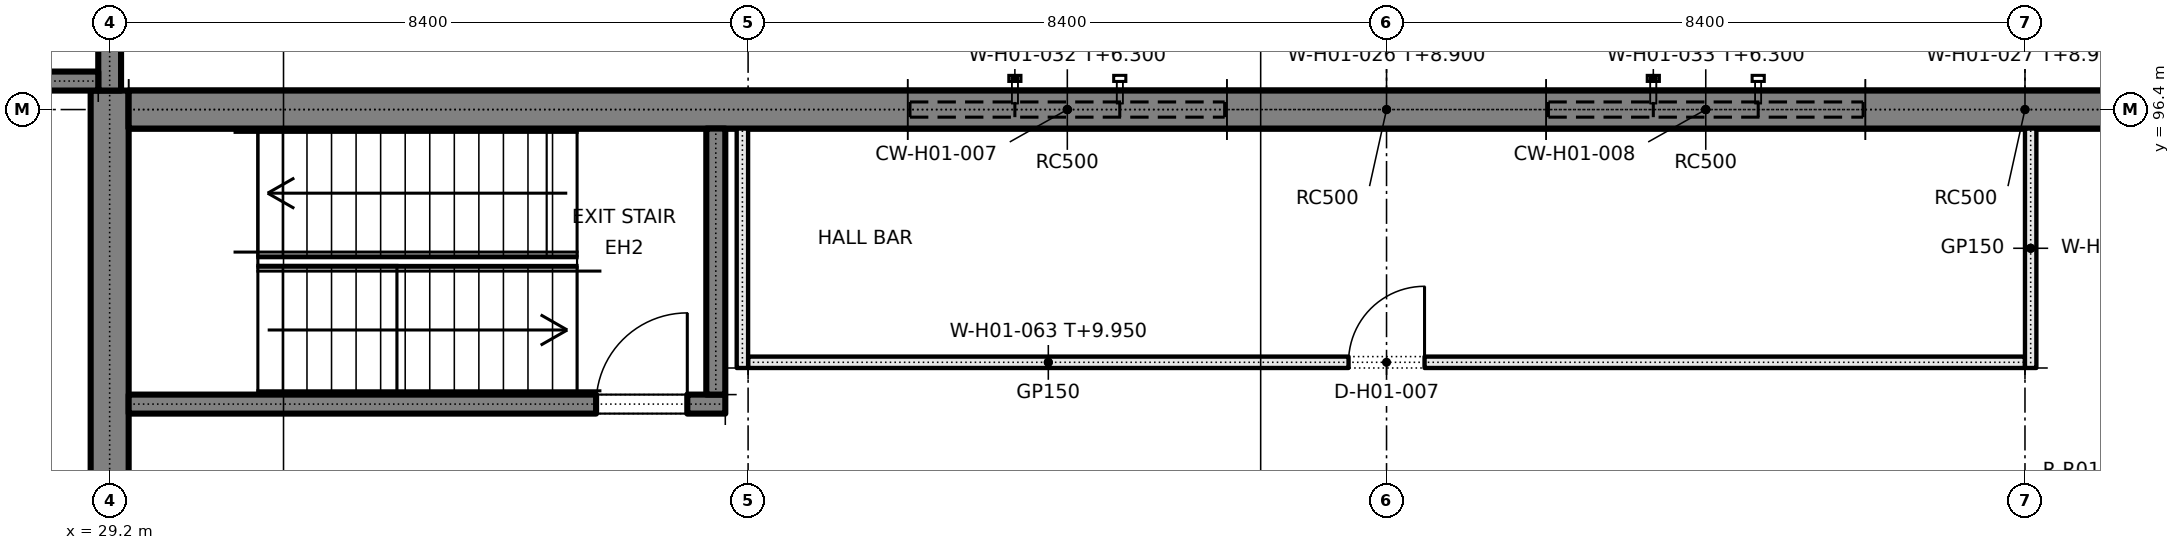
"""IFC4 building model, lengths in metres.
Left out: names, types, materials, properties, quantities, classifications, styles, units other than length and angle.
Written with IfcOpenShell. Run it as: python <this file> out.ifc"""

import sys

from ifc_helpers import new_model, si_unit, direction, frame, frame_2d, origin, place, context, subcontext, project, spatial, rectangle, extrude, element, fill, save


model = new_model("IFC4")
c1 = context("Model", 3, precision=1e-05, world=origin(), true_north=direction((0.0, 1.0)))
c2 = subcontext(c1, "Body", "Model", "MODEL_VIEW")
j1 = project(units=[si_unit("LENGTHUNIT", "METRE"), si_unit("PLANEANGLEUNIT", "RADIAN")], contexts=[c1])
p1 = place(None, origin())
s1 = spatial("IfcSite", under=j1, at=p1, CompositionType="ELEMENT")
p2 = place(p1, origin())
s2 = spatial("IfcBuilding", under=s1, at=p2, CompositionType="ELEMENT")
p3 = place(p2, frame((0.0, 0.0, 5.4)))
s3 = spatial("IfcBuildingStorey", under=s2, at=p3, CompositionType="ELEMENT", Elevation=5.4)
p4 = place(p3, frame((29.2, 54.15, 0.0), z_axis=(0.0, 0.0, 1.0), x_axis=(0.0, 1.0, 0.0)))
e1 = element("IfcWall", 1, at=p4, inside=s3, PredefinedType="SOLIDWALL", context=c2, shape_type="SweptSolid", body=[
    extrude(rectangle(XDim=42.5, YDim=0.5, at=frame_2d((21.25, 0.0))), origin(), (0.0, 0.0, 1.0), 4.8),
])
p5 = place(p4, frame((7.75, 0.0, 0.0)))
e2 = element("IfcOpeningElement", 2, at=p5, cuts=e1, PredefinedType="OPENING", context=c2, shape_type="SweptSolid", body=[
    extrude(rectangle(XDim=1.8, YDim=2.1, at=frame_2d((0.9, 1.05))), frame((0.0, 0.26, 0.0), z_axis=(0.0, -1.0, 0.0), x_axis=(1.0, 0.0, 0.0)), (0.0, 0.0, 1.0), 0.52),
])
p6 = place(p4, frame((20.35, 0.0, 0.0)))
e3 = element("IfcOpeningElement", 3, at=p6, cuts=e1, PredefinedType="OPENING", context=c2, shape_type="SweptSolid", body=[
    extrude(rectangle(XDim=1.8, YDim=2.1, at=frame_2d((0.9, 1.05))), frame((0.0, 0.26, 0.0), z_axis=(0.0, -1.0, 0.0), x_axis=(1.0, 0.0, 0.0)), (0.0, 0.0, 1.0), 0.52),
])
p7 = place(p4, frame((32.95, 0.0, 0.0)))
e4 = element("IfcOpeningElement", 4, at=p7, cuts=e1, PredefinedType="OPENING", context=c2, shape_type="SweptSolid", body=[
    extrude(rectangle(XDim=1.8, YDim=2.1, at=frame_2d((0.9, 1.05))), frame((0.0, 0.26, 0.0), z_axis=(0.0, -1.0, 0.0), x_axis=(1.0, 0.0, 0.0)), (0.0, 0.0, 1.0), 0.52),
])
p8 = place(p3, frame((29.45, 96.4, 0.0), z_axis=(0.0, 0.0, 1.0), x_axis=(1.0, 0.0, 0.0)))
e5 = element("IfcWall", 5, at=p8, inside=s3, PredefinedType="SOLIDWALL", context=c2, shape_type="SweptSolid", body=[
    extrude(rectangle(XDim=10.25, YDim=0.5, at=frame_2d((5.125, 0.0))), origin(), (0.0, 0.0, 1.0), 3.5),
])
p9 = place(p3, frame((43.9, 96.4, 0.0), z_axis=(0.0, 0.0, 1.0), x_axis=(1.0, 0.0, 0.0)))
e6 = element("IfcWall", 6, at=p9, inside=s3, PredefinedType="SOLIDWALL", context=c2, shape_type="SweptSolid", body=[
    extrude(rectangle(XDim=4.2, YDim=0.5, at=frame_2d((2.1, 0.0))), origin(), (0.0, 0.0, 1.0), 3.5),
])
p10 = place(p3, frame((52.3, 96.4, 0.0), z_axis=(0.0, 0.0, 1.0), x_axis=(1.0, 0.0, 0.0)))
e7 = element("IfcWall", 7, at=p10, inside=s3, PredefinedType="SOLIDWALL", context=c2, shape_type="SweptSolid", body=[
    extrude(rectangle(XDim=4.2, YDim=0.5, at=frame_2d((2.1, 0.0))), origin(), (0.0, 0.0, 1.0), 3.5),
])
for number, where, z_axis, x_axis in (
    (8, (39.7, 96.4, 0.0), (0.0, 0.0, 1.0), (1.0, 0.0, 0.0)),
    (9, (48.1, 96.4, 0.0), (0.0, 0.0, 1.0), (1.0, 0.0, 0.0)),
):
    element("IfcWall", number, at=place(p3, frame(where, z_axis=z_axis, x_axis=x_axis)), inside=s3, PredefinedType="SOLIDWALL", context=c2, shape_type="SweptSolid", body=[
        extrude(rectangle(XDim=4.2, YDim=0.5, at=frame_2d((2.1, 0.0))), origin(), (0.0, 0.0, 1.0), 0.9),
    ])
p11 = place(p3, frame((29.45, 96.4, 3.5), z_axis=(0.0, 0.0, 1.0), x_axis=(1.0, 0.0, 0.0)))
e10 = element("IfcWall", 10, at=p11, inside=s3, PredefinedType="SOLIDWALL", context=c2, shape_type="SweptSolid", body=[
    extrude(rectangle(XDim=66.7, YDim=0.5, at=frame_2d((33.35, 0.0))), origin(), (0.0, 0.0, 1.0), 1.3),
])
p12 = place(p3, frame((29.45, 92.525, 0.0), z_axis=(0.0, 0.0, 1.0), x_axis=(1.0, 0.0, 0.0)))
e11 = element("IfcWall", 11, at=p12, inside=s3, PredefinedType="SOLIDWALL", context=c2, shape_type="SweptSolid", body=[
    extrude(rectangle(XDim=7.85, YDim=0.25, at=frame_2d((3.925, 0.0))), origin(), (0.0, 0.0, 1.0), 4.8),
])
p13 = place(p12, frame((6.15, 0.0, 0.0)))
e12 = element("IfcOpeningElement", 12, at=p13, cuts=e11, PredefinedType="OPENING", context=c2, shape_type="SweptSolid", body=[
    extrude(rectangle(XDim=1.2, YDim=2.1, at=frame_2d((0.6, 1.05))), frame((0.0, 0.135, 0.0), z_axis=(0.0, -1.0, 0.0), x_axis=(1.0, 0.0, 0.0)), (0.0, 0.0, 1.0), 0.27),
])
p14 = place(p3, frame((37.175, 92.65, 0.0), z_axis=(0.0, 0.0, 1.0), x_axis=(0.0, 1.0, 0.0)))
e13 = element("IfcWall", 13, at=p14, inside=s3, PredefinedType="SOLIDWALL", context=c2, shape_type="SweptSolid", body=[
    extrude(rectangle(XDim=3.5, YDim=0.25, at=frame_2d((1.75, 0.0))), origin(), (0.0, 0.0, 1.0), 4.8),
])
p15 = place(p3, frame((29.2, 96.65, 0.0), z_axis=(0.0, 0.0, 1.0), x_axis=(0.0, 1.0, 0.0)))
e14 = element("IfcWall", 14, at=p15, inside=s3, PredefinedType="SOLIDWALL", context=c2, shape_type="SweptSolid", body=[
    extrude(rectangle(XDim=7.963, YDim=0.3, at=frame_2d((3.982, 0.0))), origin(), (0.0, 0.0, 1.0), 4.8),
])
p16 = place(p3, frame((37.6, 93.075, 0.0), z_axis=(0.0, 0.0, 1.0), x_axis=(1.0, 0.0, 0.0)))
e15 = element("IfcWall", 15, at=p16, inside=s3, PredefinedType="PARTITIONING", context=c2, shape_type="SweptSolid", body=[
    extrude(rectangle(XDim=16.8, YDim=0.15, at=frame_2d((8.4, 0.0))), origin(), (0.0, 0.0, 1.0), 4.55),
])
p17 = place(p16, frame((7.9, 0.0, 0.0)))
e16 = element("IfcOpeningElement", 16, at=p17, cuts=e15, PredefinedType="OPENING", context=c2, shape_type="SweptSolid", body=[
    extrude(rectangle(XDim=1.0, YDim=2.1, at=frame_2d((0.5, 1.05))), frame((0.0, 0.085, 0.0), z_axis=(0.0, -1.0, 0.0), x_axis=(1.0, 0.0, 0.0)), (0.0, 0.0, 1.0), 0.17),
])
p18 = place(p3, frame((37.525, 93.0, 0.0), z_axis=(0.0, 0.0, 1.0), x_axis=(0.0, 1.0, 0.0)))
e17 = element("IfcWall", 17, at=p18, inside=s3, PredefinedType="PARTITIONING", context=c2, shape_type="SweptSolid", body=[
    extrude(rectangle(XDim=3.15, YDim=0.15, at=frame_2d((1.575, 0.0))), origin(), (0.0, 0.0, 1.0), 3.95),
])
p19 = place(p3, frame((54.475, 93.0, 0.0), z_axis=(0.0, 0.0, 1.0), x_axis=(0.0, 1.0, 0.0)))
e18 = element("IfcWall", 18, at=p19, inside=s3, PredefinedType="PARTITIONING", context=c2, shape_type="SweptSolid", body=[
    extrude(rectangle(XDim=3.15, YDim=0.15, at=frame_2d((1.575, 0.0))), origin(), (0.0, 0.0, 1.0), 4.55),
])
p20 = place(p3, frame((25.8, 96.775, 0.0), z_axis=(0.0, 0.0, 1.0), x_axis=(1.0, 0.0, 0.0)))
e19 = element("IfcWall", 19, at=p20, inside=s3, PredefinedType="SHEAR", context=c2, shape_type="SweptSolid", body=[
    extrude(rectangle(XDim=3.25, YDim=0.25, at=frame_2d((1.625, 0.0))), origin(), (0.0, 0.0, 1.0), 4.8),
])
p21 = place(p17, origin())
e20 = element("IfcDoor", 20, at=p21, inside=s3, OperationType="SINGLE_SWING_RIGHT", PredefinedType="DOOR", context=c2, shape_type="SweptSolid", body=[
    extrude(rectangle(XDim=1.0, YDim=2.1, at=frame_2d((0.5, 1.05))), frame((0.0, 0.025, 0.0), z_axis=(0.0, -1.0, 0.0), x_axis=(1.0, 0.0, 0.0)), (0.0, 0.0, 1.0), 0.05),
])
fill(e16, e20)
p22 = place(p13, origin())
e21 = element("IfcDoor", 21, at=p22, inside=s3, OperationType="SINGLE_SWING_RIGHT", PredefinedType="DOOR", context=c2, shape_type="SweptSolid", body=[
    extrude(rectangle(XDim=1.2, YDim=2.1, at=frame_2d((0.6, 1.05))), frame((0.0, 0.025, 0.0), z_axis=(0.0, -1.0, 0.0), x_axis=(1.0, 0.0, 0.0)), (0.0, 0.0, 1.0), 0.05),
])
fill(e12, e21)
save(model, sys.argv[1])
